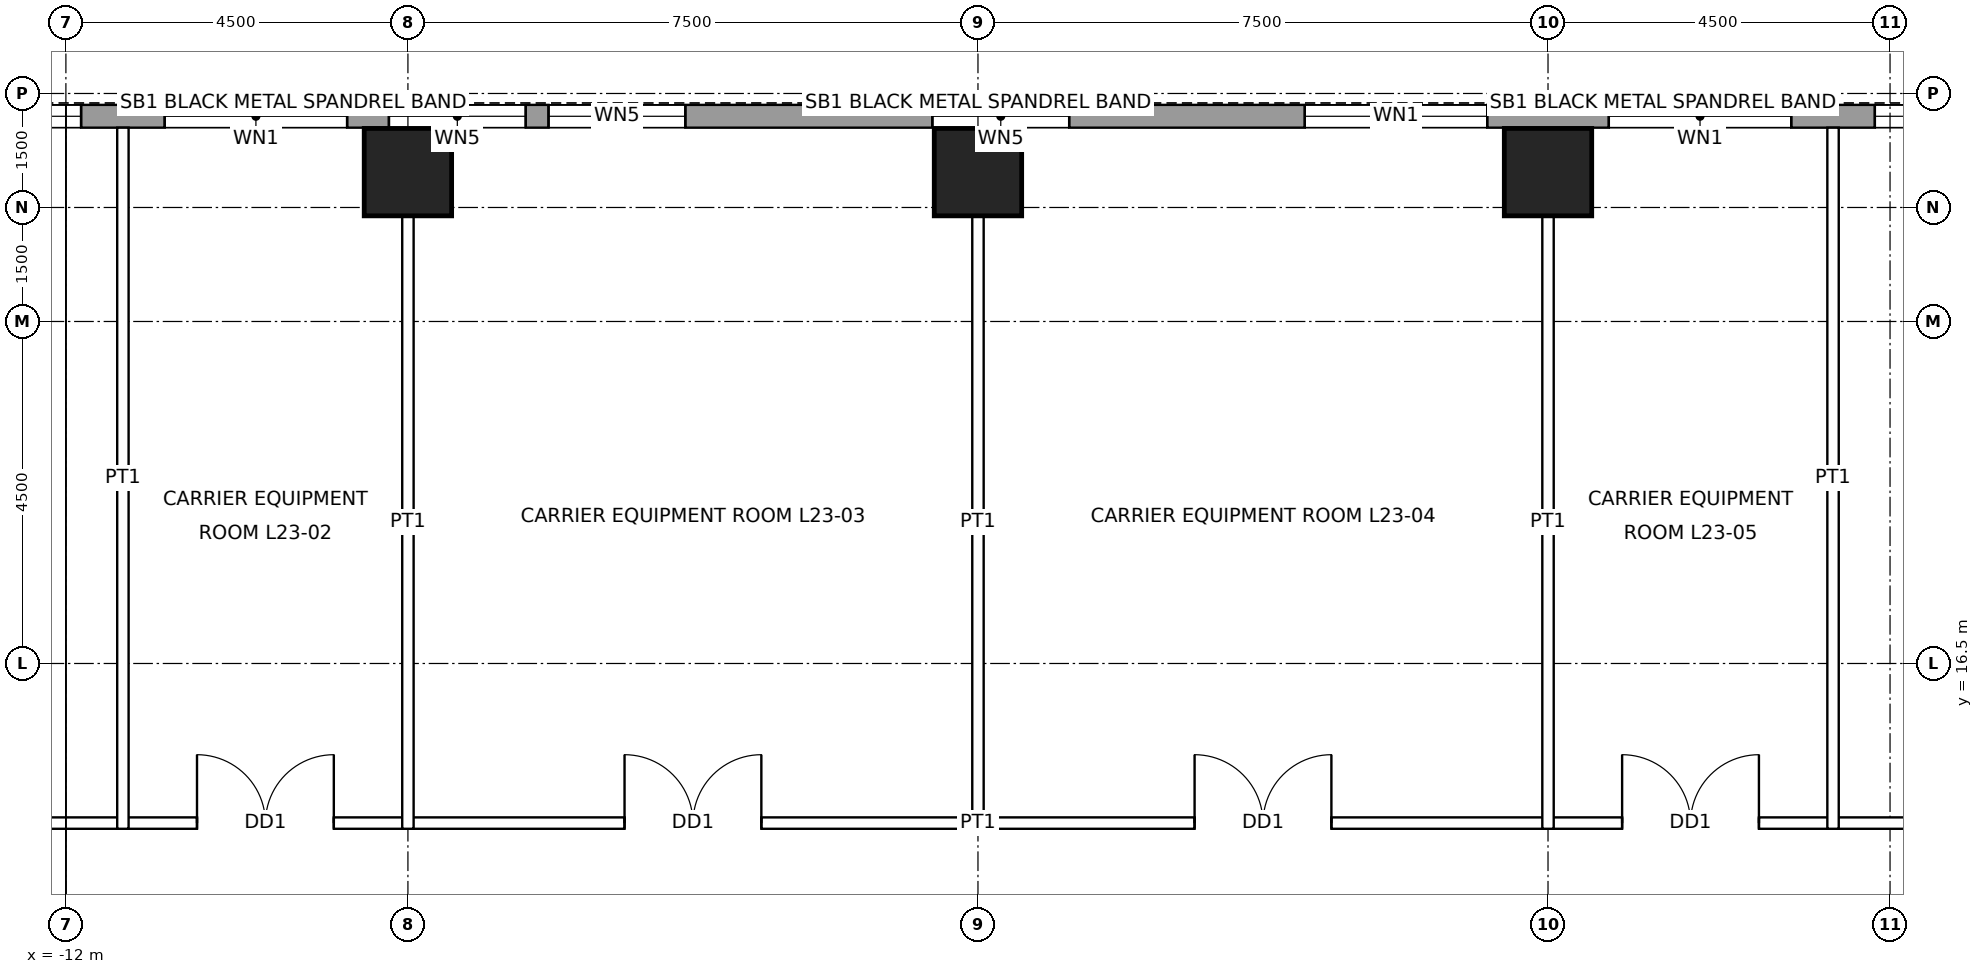
"""IFC4 building model, lengths in metres.
Left out: names, types, materials, properties, quantities, classifications, styles, units other than length and angle.
Written with IfcOpenShell. Run it as: python <this file> out.ifc"""

import sys

from ifc_helpers import new_model, si_unit, direction, frame, frame_2d, origin, origin_2d, place, context, subcontext, project, spatial, rectangle, hollow_rectangle, extrude, element, fill, save


model = new_model("IFC4")
c1 = context("Model", 3, precision=1e-05, world=origin(), true_north=direction((0.0, 1.0)))
c2 = subcontext(c1, "Body", "Model", "MODEL_VIEW")
j1 = project(units=[si_unit("LENGTHUNIT", "METRE"), si_unit("PLANEANGLEUNIT", "RADIAN")], contexts=[c1])
p1 = place(None, origin())
s1 = spatial("IfcSite", under=j1, at=p1, CompositionType="ELEMENT")
p2 = place(p1, origin())
s2 = spatial("IfcBuilding", under=s1, at=p2, CompositionType="ELEMENT")
p3 = place(p2, frame((0.0, 0.0, 117.9)))
s3 = spatial("IfcBuildingStorey", under=s2, at=p3, CompositionType="ELEMENT", Elevation=117.9)
for number, where, z_axis, x_axis in (
    (1, (-7.5, 22.965, 0.0), (0.0, 0.0, 1.0), (1.0, 0.0, 0.0)),
    (2, (0.0, 22.965, 0.0), (0.0, 0.0, 1.0), (1.0, 0.0, 0.0)),
    (3, (7.5, 22.965, 0.0), (0.0, 0.0, 1.0), (1.0, 0.0, 0.0)),
):
    element("IfcColumn", number, at=place(p3, frame(where, z_axis=z_axis, x_axis=x_axis)), inside=s3, PredefinedType="COLUMN", context=c2, shape_type="SweptSolid", body=[
        extrude(hollow_rectangle(XDim=1.15, YDim=1.15, WallThickness=0.075, at=origin_2d()), origin(), (0.0, 0.0, 1.0), 4.5),
    ])
p4 = place(p3, frame((-16.2, 23.7, 0.0), z_axis=(0.0, 0.0, 1.0), x_axis=(1.0, 0.0, 0.0)))
e4 = element("IfcWall", 4, at=p4, inside=s3, PredefinedType="SOLIDWALL", context=c2, shape_type="SweptSolid", body=[
    extrude(rectangle(XDim=32.4, YDim=0.3, at=frame_2d((16.2, 0.0))), origin(), (0.0, 0.0, 1.0), 4.3),
])
p5 = place(p4, frame((2.0, 0.0, 1.0)))
e5 = element("IfcOpeningElement", 5, at=p5, cuts=e4, PredefinedType="OPENING", context=c2, shape_type="SweptSolid", body=[
    extrude(rectangle(XDim=2.4, YDim=1.2, at=frame_2d((1.2, 0.6))), frame((0.0, 0.16, 0.0), z_axis=(0.0, -1.0, 0.0), x_axis=(1.0, 0.0, 0.0)), (0.0, 0.0, 1.0), 0.32),
])
p6 = place(p4, frame((5.5, 0.0, 1.0)))
e6 = element("IfcOpeningElement", 6, at=p6, cuts=e4, PredefinedType="OPENING", context=c2, shape_type="SweptSolid", body=[
    extrude(rectangle(XDim=2.4, YDim=1.2, at=frame_2d((1.2, 0.6))), frame((0.0, 0.16, 0.0), z_axis=(0.0, -1.0, 0.0), x_axis=(1.0, 0.0, 0.0)), (0.0, 0.0, 1.0), 0.32),
])
p7 = place(p4, frame((8.45, 0.0, 1.0)))
e7 = element("IfcOpeningElement", 7, at=p7, cuts=e4, PredefinedType="OPENING", context=c2, shape_type="SweptSolid", body=[
    extrude(rectangle(XDim=1.8, YDim=1.2, at=frame_2d((0.9, 0.6))), frame((0.0, 0.16, 0.0), z_axis=(0.0, -1.0, 0.0), x_axis=(1.0, 0.0, 0.0)), (0.0, 0.0, 1.0), 0.32),
])
p8 = place(p4, frame((10.55, 0.0, 1.0)))
e8 = element("IfcOpeningElement", 8, at=p8, cuts=e4, PredefinedType="OPENING", context=c2, shape_type="SweptSolid", body=[
    extrude(rectangle(XDim=1.8, YDim=1.2, at=frame_2d((0.9, 0.6))), frame((0.0, 0.16, 0.0), z_axis=(0.0, -1.0, 0.0), x_axis=(1.0, 0.0, 0.0)), (0.0, 0.0, 1.0), 0.32),
])
p9 = place(p4, frame((15.6, 0.0, 1.0)))
e9 = element("IfcOpeningElement", 9, at=p9, cuts=e4, PredefinedType="OPENING", context=c2, shape_type="SweptSolid", body=[
    extrude(rectangle(XDim=1.8, YDim=1.2, at=frame_2d((0.9, 0.6))), frame((0.0, 0.16, 0.0), z_axis=(0.0, -1.0, 0.0), x_axis=(1.0, 0.0, 0.0)), (0.0, 0.0, 1.0), 0.32),
])
p10 = place(p4, frame((20.5, 0.0, 1.0)))
e10 = element("IfcOpeningElement", 10, at=p10, cuts=e4, PredefinedType="OPENING", context=c2, shape_type="SweptSolid", body=[
    extrude(rectangle(XDim=2.4, YDim=1.2, at=frame_2d((1.2, 0.6))), frame((0.0, 0.16, 0.0), z_axis=(0.0, -1.0, 0.0), x_axis=(1.0, 0.0, 0.0)), (0.0, 0.0, 1.0), 0.32),
])
p11 = place(p4, frame((24.5, 0.0, 1.0)))
e11 = element("IfcOpeningElement", 11, at=p11, cuts=e4, PredefinedType="OPENING", context=c2, shape_type="SweptSolid", body=[
    extrude(rectangle(XDim=2.4, YDim=1.2, at=frame_2d((1.2, 0.6))), frame((0.0, 0.16, 0.0), z_axis=(0.0, -1.0, 0.0), x_axis=(1.0, 0.0, 0.0)), (0.0, 0.0, 1.0), 0.32),
])
p12 = place(p4, frame((28.0, 0.0, 1.0)))
e12 = element("IfcOpeningElement", 12, at=p12, cuts=e4, PredefinedType="OPENING", context=c2, shape_type="SweptSolid", body=[
    extrude(rectangle(XDim=2.4, YDim=1.2, at=frame_2d((1.2, 0.6))), frame((0.0, 0.16, 0.0), z_axis=(0.0, -1.0, 0.0), x_axis=(1.0, 0.0, 0.0)), (0.0, 0.0, 1.0), 0.32),
])
p13 = place(p3, frame((-14.475, 14.4, 0.0), z_axis=(0.0, 0.0, 1.0), x_axis=(1.0, 0.0, 0.0)))
e13 = element("IfcWall", 13, at=p13, inside=s3, PredefinedType="PARTITIONING", context=c2, shape_type="SweptSolid", body=[
    extrude(rectangle(XDim=28.95, YDim=0.15, at=frame_2d((14.475, 0.0))), origin(), (0.0, 0.0, 1.0), 4.3),
])
p14 = place(p13, frame((4.2, 0.0, 0.0)))
e14 = element("IfcOpeningElement", 14, at=p14, cuts=e13, PredefinedType="OPENING", context=c2, shape_type="SweptSolid", body=[
    extrude(rectangle(XDim=1.8, YDim=2.4, at=frame_2d((0.9, 1.2))), frame((0.0, 0.085, 0.0), z_axis=(0.0, -1.0, 0.0), x_axis=(1.0, 0.0, 0.0)), (0.0, 0.0, 1.0), 0.17),
])
p15 = place(p13, frame((9.825, 0.0, 0.0)))
e15 = element("IfcOpeningElement", 15, at=p15, cuts=e13, PredefinedType="OPENING", context=c2, shape_type="SweptSolid", body=[
    extrude(rectangle(XDim=1.8, YDim=2.4, at=frame_2d((0.9, 1.2))), frame((0.0, 0.085, 0.0), z_axis=(0.0, -1.0, 0.0), x_axis=(1.0, 0.0, 0.0)), (0.0, 0.0, 1.0), 0.17),
])
p16 = place(p13, frame((17.325, 0.0, 0.0)))
e16 = element("IfcOpeningElement", 16, at=p16, cuts=e13, PredefinedType="OPENING", context=c2, shape_type="SweptSolid", body=[
    extrude(rectangle(XDim=1.8, YDim=2.4, at=frame_2d((0.9, 1.2))), frame((0.0, 0.085, 0.0), z_axis=(0.0, -1.0, 0.0), x_axis=(1.0, 0.0, 0.0)), (0.0, 0.0, 1.0), 0.17),
])
p17 = place(p13, frame((22.95, 0.0, 0.0)))
e17 = element("IfcOpeningElement", 17, at=p17, cuts=e13, PredefinedType="OPENING", context=c2, shape_type="SweptSolid", body=[
    extrude(rectangle(XDim=1.8, YDim=2.4, at=frame_2d((0.9, 1.2))), frame((0.0, 0.085, 0.0), z_axis=(0.0, -1.0, 0.0), x_axis=(1.0, 0.0, 0.0)), (0.0, 0.0, 1.0), 0.17),
])
p18 = place(p13, frame((26.8, 0.0, 0.0)))
e18 = element("IfcOpeningElement", 18, at=p18, cuts=e13, PredefinedType="OPENING", context=c2, shape_type="SweptSolid", body=[
    extrude(rectangle(XDim=1.0, YDim=2.1, at=frame_2d((0.5, 1.05))), frame((0.0, 0.085, 0.0), z_axis=(0.0, -1.0, 0.0), x_axis=(1.0, 0.0, 0.0)), (0.0, 0.0, 1.0), 0.17),
])
p19 = place(p13, frame((1.15, 0.0, 0.0)))
e19 = element("IfcOpeningElement", 19, at=p19, cuts=e13, PredefinedType="OPENING", context=c2, shape_type="SweptSolid", body=[
    extrude(rectangle(XDim=1.0, YDim=2.1, at=frame_2d((0.5, 1.05))), frame((0.0, 0.085, 0.0), z_axis=(0.0, -1.0, 0.0), x_axis=(1.0, 0.0, 0.0)), (0.0, 0.0, 1.0), 0.17),
])
p20 = place(p3, frame((-11.25, 14.325, 0.0), z_axis=(0.0, 0.0, 1.0), x_axis=(0.0, 1.0, 0.0)))
e20 = element("IfcWall", 20, at=p20, inside=s3, PredefinedType="PARTITIONING", context=c2, shape_type="SweptSolid", body=[
    extrude(rectangle(XDim=9.225, YDim=0.15, at=frame_2d((4.613, 0.0))), origin(), (0.0, 0.0, 1.0), 3.431),
])
for number, where, z_axis, x_axis in (
    (21, (-7.5, 14.325, 0.0), (0.0, 0.0, 1.0), (0.0, 1.0, 0.0)),
    (22, (0.0, 14.325, 0.0), (0.0, 0.0, 1.0), (0.0, 1.0, 0.0)),
    (23, (7.5, 14.325, 0.0), (0.0, 0.0, 1.0), (0.0, 1.0, 0.0)),
):
    element("IfcWall", number, at=place(p3, frame(where, z_axis=z_axis, x_axis=x_axis)), inside=s3, PredefinedType="PARTITIONING", context=c2, shape_type="SweptSolid", body=[
        extrude(rectangle(XDim=8.065, YDim=0.15, at=frame_2d((4.032, 0.0))), origin(), (0.0, 0.0, 1.0), 3.431),
    ])
p21 = place(p3, frame((11.25, 14.325, 0.0), z_axis=(0.0, 0.0, 1.0), x_axis=(0.0, 1.0, 0.0)))
e24 = element("IfcWall", 24, at=p21, inside=s3, PredefinedType="PARTITIONING", context=c2, shape_type="SweptSolid", body=[
    extrude(rectangle(XDim=9.225, YDim=0.15, at=frame_2d((4.613, 0.0))), origin(), (0.0, 0.0, 1.0), 3.431),
])
p22 = place(p5, origin())
e25 = element("IfcWindow", 25, at=p22, inside=s3, PartitioningType="SINGLE_PANEL", PredefinedType="WINDOW", context=c2, shape_type="SweptSolid", body=[
    extrude(rectangle(XDim=2.4, YDim=1.2, at=frame_2d((1.2, 0.6))), frame((0.0, 0.03, 0.0), z_axis=(0.0, -1.0, 0.0), x_axis=(1.0, 0.0, 0.0)), (0.0, 0.0, 1.0), 0.06),
])
fill(e5, e25)
p23 = place(p6, origin())
e26 = element("IfcWindow", 26, at=p23, inside=s3, PartitioningType="SINGLE_PANEL", PredefinedType="WINDOW", context=c2, shape_type="SweptSolid", body=[
    extrude(rectangle(XDim=2.4, YDim=1.2, at=frame_2d((1.2, 0.6))), frame((0.0, 0.03, 0.0), z_axis=(0.0, -1.0, 0.0), x_axis=(1.0, 0.0, 0.0)), (0.0, 0.0, 1.0), 0.06),
])
fill(e6, e26)
p24 = place(p7, origin())
e27 = element("IfcWindow", 27, at=p24, inside=s3, PartitioningType="SINGLE_PANEL", PredefinedType="WINDOW", context=c2, shape_type="SweptSolid", body=[
    extrude(rectangle(XDim=1.8, YDim=1.2, at=frame_2d((0.9, 0.6))), frame((0.0, 0.03, 0.0), z_axis=(0.0, -1.0, 0.0), x_axis=(1.0, 0.0, 0.0)), (0.0, 0.0, 1.0), 0.06),
])
fill(e7, e27)
p25 = place(p8, origin())
e28 = element("IfcWindow", 28, at=p25, inside=s3, PartitioningType="SINGLE_PANEL", PredefinedType="WINDOW", context=c2, shape_type="SweptSolid", body=[
    extrude(rectangle(XDim=1.8, YDim=1.2, at=frame_2d((0.9, 0.6))), frame((0.0, 0.03, 0.0), z_axis=(0.0, -1.0, 0.0), x_axis=(1.0, 0.0, 0.0)), (0.0, 0.0, 1.0), 0.06),
])
fill(e8, e28)
p26 = place(p9, origin())
e29 = element("IfcWindow", 29, at=p26, inside=s3, PartitioningType="SINGLE_PANEL", PredefinedType="WINDOW", context=c2, shape_type="SweptSolid", body=[
    extrude(rectangle(XDim=1.8, YDim=1.2, at=frame_2d((0.9, 0.6))), frame((0.0, 0.03, 0.0), z_axis=(0.0, -1.0, 0.0), x_axis=(1.0, 0.0, 0.0)), (0.0, 0.0, 1.0), 0.06),
])
fill(e9, e29)
p27 = place(p10, origin())
e30 = element("IfcWindow", 30, at=p27, inside=s3, PartitioningType="SINGLE_PANEL", PredefinedType="WINDOW", context=c2, shape_type="SweptSolid", body=[
    extrude(rectangle(XDim=2.4, YDim=1.2, at=frame_2d((1.2, 0.6))), frame((0.0, 0.03, 0.0), z_axis=(0.0, -1.0, 0.0), x_axis=(1.0, 0.0, 0.0)), (0.0, 0.0, 1.0), 0.06),
])
fill(e10, e30)
p28 = place(p11, origin())
e31 = element("IfcWindow", 31, at=p28, inside=s3, PartitioningType="SINGLE_PANEL", PredefinedType="WINDOW", context=c2, shape_type="SweptSolid", body=[
    extrude(rectangle(XDim=2.4, YDim=1.2, at=frame_2d((1.2, 0.6))), frame((0.0, 0.03, 0.0), z_axis=(0.0, -1.0, 0.0), x_axis=(1.0, 0.0, 0.0)), (0.0, 0.0, 1.0), 0.06),
])
fill(e11, e31)
p29 = place(p12, origin())
e32 = element("IfcWindow", 32, at=p29, inside=s3, PartitioningType="SINGLE_PANEL", PredefinedType="WINDOW", context=c2, shape_type="SweptSolid", body=[
    extrude(rectangle(XDim=2.4, YDim=1.2, at=frame_2d((1.2, 0.6))), frame((0.0, 0.03, 0.0), z_axis=(0.0, -1.0, 0.0), x_axis=(1.0, 0.0, 0.0)), (0.0, 0.0, 1.0), 0.06),
])
fill(e12, e32)
p30 = place(p14, origin())
e33 = element("IfcDoor", 33, at=p30, inside=s3, OperationType="DOUBLE_DOOR_SINGLE_SWING", PredefinedType="DOOR", context=c2, shape_type="SweptSolid", body=[
    extrude(rectangle(XDim=1.8, YDim=2.4, at=frame_2d((0.9, 1.2))), frame((0.0, 0.025, 0.0), z_axis=(0.0, -1.0, 0.0), x_axis=(1.0, 0.0, 0.0)), (0.0, 0.0, 1.0), 0.05),
])
fill(e14, e33)
p31 = place(p15, origin())
e34 = element("IfcDoor", 34, at=p31, inside=s3, OperationType="DOUBLE_DOOR_SINGLE_SWING", PredefinedType="DOOR", context=c2, shape_type="SweptSolid", body=[
    extrude(rectangle(XDim=1.8, YDim=2.4, at=frame_2d((0.9, 1.2))), frame((0.0, 0.025, 0.0), z_axis=(0.0, -1.0, 0.0), x_axis=(1.0, 0.0, 0.0)), (0.0, 0.0, 1.0), 0.05),
])
fill(e15, e34)
p32 = place(p16, origin())
e35 = element("IfcDoor", 35, at=p32, inside=s3, OperationType="DOUBLE_DOOR_SINGLE_SWING", PredefinedType="DOOR", context=c2, shape_type="SweptSolid", body=[
    extrude(rectangle(XDim=1.8, YDim=2.4, at=frame_2d((0.9, 1.2))), frame((0.0, 0.025, 0.0), z_axis=(0.0, -1.0, 0.0), x_axis=(1.0, 0.0, 0.0)), (0.0, 0.0, 1.0), 0.05),
])
fill(e16, e35)
p33 = place(p17, origin())
e36 = element("IfcDoor", 36, at=p33, inside=s3, OperationType="DOUBLE_DOOR_SINGLE_SWING", PredefinedType="DOOR", context=c2, shape_type="SweptSolid", body=[
    extrude(rectangle(XDim=1.8, YDim=2.4, at=frame_2d((0.9, 1.2))), frame((0.0, 0.025, 0.0), z_axis=(0.0, -1.0, 0.0), x_axis=(1.0, 0.0, 0.0)), (0.0, 0.0, 1.0), 0.05),
])
fill(e17, e36)
save(model, sys.argv[1])
